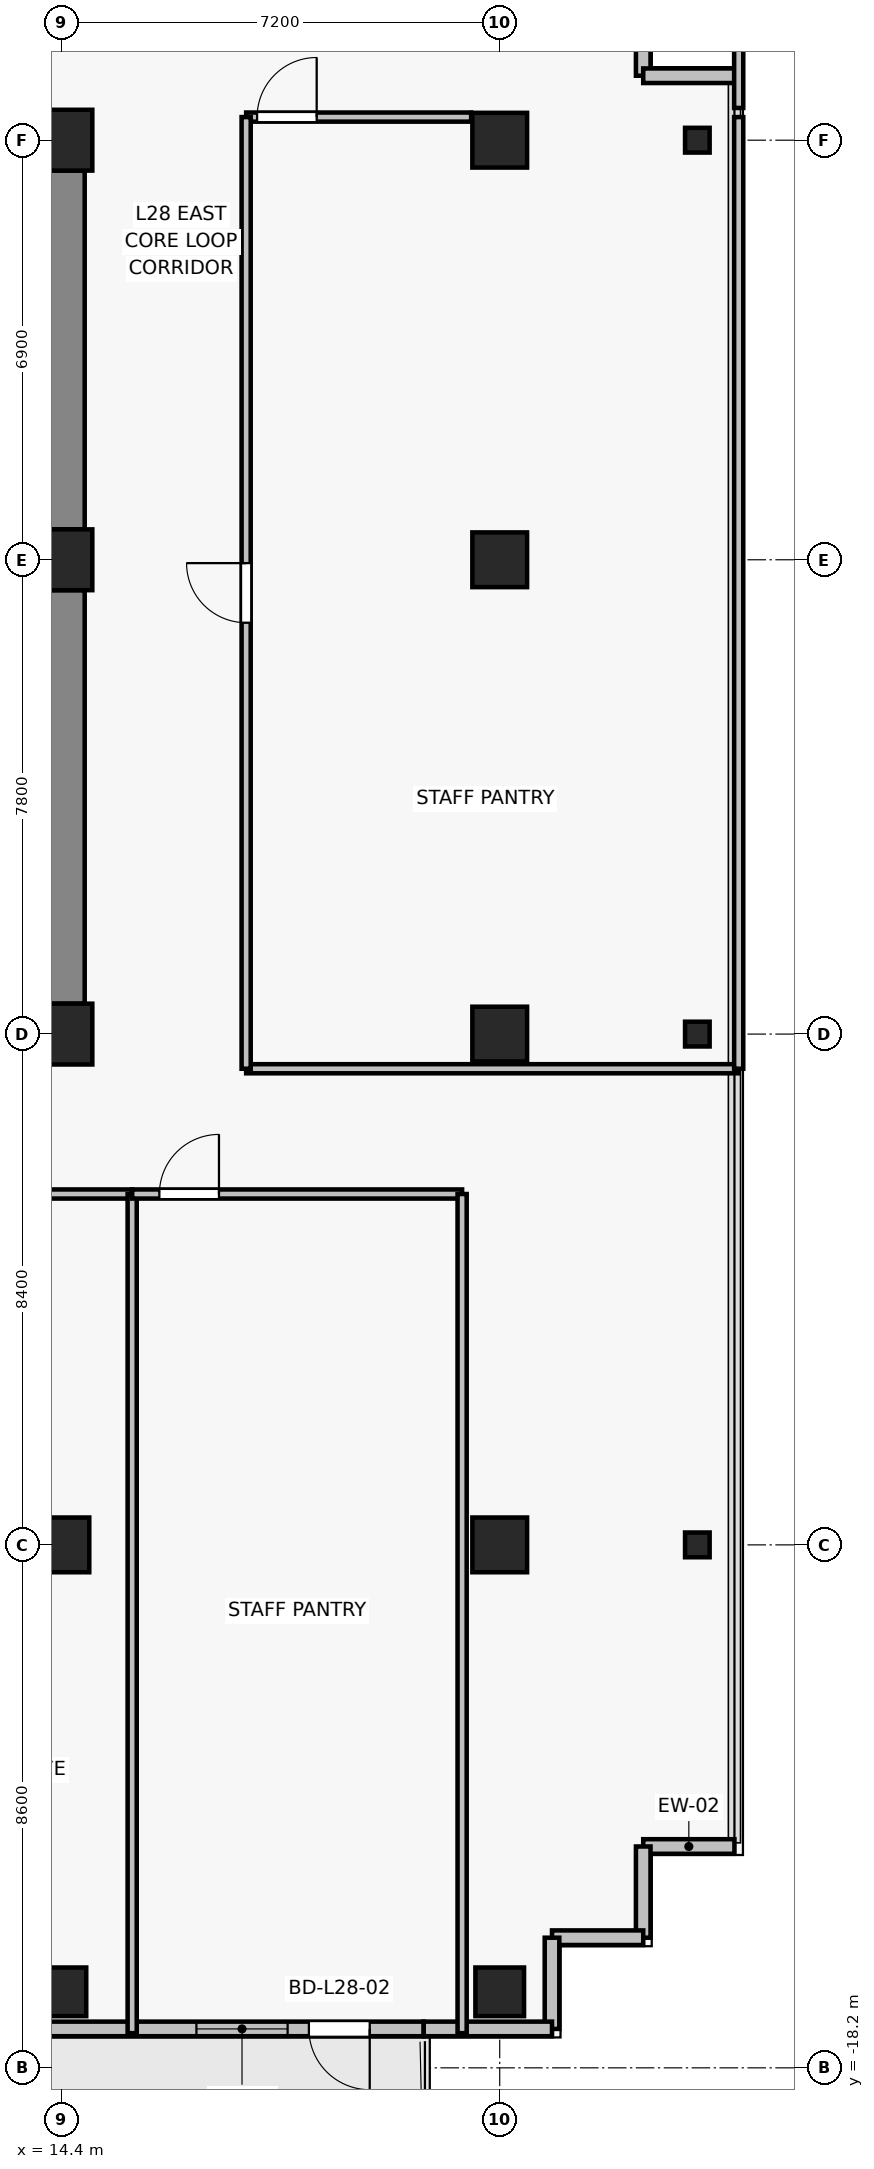
"""IFC4 building model, lengths in metres.
Left out: names, types, materials, properties, quantities, classifications, styles, units other than length and angle.
Written with IfcOpenShell. Run it as: python <this file> out.ifc"""

import sys

from ifc_helpers import new_model, si_unit, direction, frame, frame_2d, origin, origin_2d, place, context, subcontext, project, spatial, rectangle, i_section, extrude, source, transform, mapped, element, fill, save


model = new_model("IFC4")
c1 = context("Model", 3, precision=1e-05, world=origin(), true_north=direction((0.0, 1.0)))
c2 = subcontext(c1, "Body", "Model", "MODEL_VIEW")
j1 = project(units=[si_unit("LENGTHUNIT", "METRE"), si_unit("PLANEANGLEUNIT", "RADIAN")], contexts=[c1])
p1 = place(None, origin())
s1 = spatial("IfcSite", under=j1, at=p1, CompositionType="ELEMENT")
p2 = place(p1, origin())
s2 = spatial("IfcBuilding", under=s1, at=p2, CompositionType="ELEMENT")
p3 = place(p2, frame((0.0, 0.0, 103.3)))
s3 = spatial("IfcBuildingStorey", under=s2, at=p3, CompositionType="ELEMENT", Elevation=103.3)
for number, where, z_axis, x_axis in (
    (1, (14.4, -1.2, 0.0), (0.0, 0.0, 1.0), (1.0, 0.0, 0.0)),
    (2, (14.4, 6.6, 0.0), (0.0, 0.0, 1.0), (1.0, 0.0, 0.0)),
    (3, (14.4, 13.5, 0.0), (0.0, 0.0, 1.0), (1.0, 0.0, 0.0)),
):
    element("IfcColumn", number, at=place(p3, frame(where, z_axis=z_axis, x_axis=x_axis)), inside=s3, PredefinedType="COLUMN", context=c2, shape_type="SweptSolid", body=[
        extrude(rectangle(XDim=1.0, YDim=1.0, at=origin_2d()), origin(), (0.0, 0.0, 1.0), 3.3),
    ])
for number, where, z_axis, x_axis in (
    (4, (14.4, -9.6, 0.0), (0.0, 0.0, 1.0), (1.0, 0.0, 0.0)),
    (5, (21.6, -9.6, 0.0), (0.0, 0.0, 1.0), (1.0, 0.0, 0.0)),
    (6, (21.6, -1.2, 0.0), (0.0, 0.0, 1.0), (1.0, 0.0, 0.0)),
    (7, (21.6, 6.6, 0.0), (0.0, 0.0, 1.0), (1.0, 0.0, 0.0)),
    (8, (21.6, 13.5, 0.0), (0.0, 0.0, 1.0), (1.0, 0.0, 0.0)),
):
    element("IfcColumn", number, at=place(p3, frame(where, z_axis=z_axis, x_axis=x_axis)), inside=s3, PredefinedType="COLUMN", context=c2, shape_type="SweptSolid", body=[
        extrude(rectangle(XDim=0.9, YDim=0.9, at=origin_2d()), origin(), (0.0, 0.0, 1.0), 3.3),
    ])
for number, where, z_axis, x_axis in (
    (9, (14.4, -16.95, 0.0), (0.0, 0.0, 1.0), (1.0, 0.0, 0.0)),
    (10, (21.6, -16.95, 0.0), (0.0, 0.0, 1.0), (1.0, 0.0, 0.0)),
):
    element("IfcColumn", number, at=place(p3, frame(where, z_axis=z_axis, x_axis=x_axis)), inside=s3, PredefinedType="COLUMN", context=c2, shape_type="SweptSolid", body=[
        extrude(rectangle(XDim=0.8, YDim=0.8, at=origin_2d()), origin(), (0.0, 0.0, 1.0), 3.3),
    ])
for number, where, z_axis, x_axis in (
    (11, (24.85, -9.6, 0.0), (0.0, 0.0, 1.0), (1.0, 0.0, 0.0)),
    (12, (24.85, -1.2, 0.0), (0.0, 0.0, 1.0), (1.0, 0.0, 0.0)),
    (13, (24.85, 13.5, 0.0), (0.0, 0.0, 1.0), (1.0, 0.0, 0.0)),
):
    element("IfcColumn", number, at=place(p3, frame(where, z_axis=z_axis, x_axis=x_axis)), inside=s3, PredefinedType="COLUMN", context=c2, shape_type="SweptSolid", body=[
        extrude(i_section(OverallWidth=0.404, OverallDepth=0.407, WebThickness=0.022, FlangeThickness=0.032, FilletRadius=0.015, at=origin_2d()), origin(), (0.0, 0.0, 1.0), 3.3),
    ])
p4 = place(p3, frame((14.4, -0.7, 0.0), z_axis=(0.0, 0.0, 1.0), x_axis=(0.0, 1.0, 0.0)))
e14 = element("IfcWall", 14, at=p4, inside=s3, PredefinedType="SHEAR", context=c2, shape_type="SweptSolid", body=[
    extrude(rectangle(XDim=6.8, YDim=0.75, at=frame_2d((3.4, 0.0))), origin(), (0.0, 0.0, 1.0), 3.075),
])
p5 = place(p3, frame((14.4, 7.1, 0.0), z_axis=(0.0, 0.0, 1.0), x_axis=(0.0, 1.0, 0.0)))
e15 = element("IfcWall", 15, at=p5, inside=s3, PredefinedType="SHEAR", context=c2, shape_type="SweptSolid", body=[
    extrude(rectangle(XDim=5.9, YDim=0.75, at=frame_2d((2.95, 0.0))), origin(), (0.0, 0.0, 1.0), 3.075),
])
p6 = place(p3, frame((20.35, -17.56, 0.0), z_axis=(0.0, 0.0, 1.0), x_axis=(-1.0, 0.0, 0.0)))
e16 = element("IfcWall", 16, at=p6, inside=s3, PredefinedType="SOLIDWALL", context=c2, shape_type="SweptSolid", body=[
    extrude(rectangle(XDim=7.4, YDim=0.24, at=frame_2d((3.7, 0.0))), origin(), (0.0, 0.0, 1.0), 2.665),
])
p7 = place(p6, frame((0.888, 0.0, 0.0)))
e17 = element("IfcOpeningElement", 17, at=p7, cuts=e16, PredefinedType="OPENING", context=c2, shape_type="SweptSolid", body=[
    extrude(rectangle(XDim=1.0, YDim=2.2, at=frame_2d((0.5, 1.1))), frame((0.0, 0.13, 0.0), z_axis=(0.0, -1.0, 0.0), x_axis=(1.0, 0.0, 0.0)), (0.0, 0.0, 1.0), 0.26),
])
p8 = place(p6, frame((2.238, 0.0, 0.85)))
e18 = element("IfcOpeningElement", 18, at=p8, cuts=e16, PredefinedType="OPENING", context=c2, shape_type="SweptSolid", body=[
    extrude(rectangle(XDim=1.5, YDim=1.6, at=frame_2d((0.75, 0.8))), frame((0.0, 0.13, 0.0), z_axis=(0.0, -1.0, 0.0), x_axis=(1.0, 0.0, 0.0)), (0.0, 0.0, 1.0), 0.26),
])
for number, where, z_axis, x_axis in (
    (19, (23.96, 14.56, 0.0), (0.0, 0.0, 1.0), (0.0, 1.0, 0.0)),
    (20, (25.46, 14.56, 0.0), (0.0, 0.0, 1.0), (-1.0, 0.0, 0.0)),
    (21, (23.96, -14.56, 0.0), (0.0, 0.0, 1.0), (1.0, 0.0, 0.0)),
    (22, (23.96, -16.06, 0.0), (0.0, 0.0, 1.0), (0.0, 1.0, 0.0)),
    (23, (22.46, -16.06, 0.0), (0.0, 0.0, 1.0), (1.0, 0.0, 0.0)),
):
    element("IfcWall", number, at=place(p3, frame(where, z_axis=z_axis, x_axis=x_axis)), inside=s3, PredefinedType="SOLIDWALL", context=c2, shape_type="SweptSolid", body=[
        extrude(rectangle(XDim=1.5, YDim=0.24, at=frame_2d((0.75, 0.0))), origin(), (0.0, 0.0, 1.0), 3.075),
    ])
p9 = place(p3, frame((22.46, -17.56, 0.0), z_axis=(0.0, 0.0, 1.0), x_axis=(0.0, 1.0, 0.0)))
e24 = element("IfcWall", 24, at=p9, inside=s3, PredefinedType="SOLIDWALL", context=c2, shape_type="SweptSolid", body=[
    extrude(rectangle(XDim=1.5, YDim=0.24, at=frame_2d((0.75, 0.0))), origin(), (0.0, 0.0, 1.0), 2.565),
])
p10 = place(p3, frame((20.35, -17.56, 0.0), z_axis=(0.0, 0.0, 1.0), x_axis=(1.0, 0.0, 0.0)))
e25 = element("IfcWall", 25, at=p10, inside=s3, PredefinedType="SOLIDWALL", context=c2, shape_type="SweptSolid", body=[
    extrude(rectangle(XDim=2.11, YDim=0.24, at=frame_2d((1.055, 0.0))), origin(), (0.0, 0.0, 1.0), 3.075),
])
p11 = place(p3, frame((10.568, -3.83, 0.0), z_axis=(0.0, 0.0, 1.0), x_axis=(1.0, 0.0, 0.0)))
e26 = element("IfcWall", 26, at=p11, inside=s3, PredefinedType="PARTITIONING", context=c2, shape_type="SweptSolid", body=[
    extrude(rectangle(XDim=4.987, YDim=0.15, at=frame_2d((2.494, 0.0))), origin(), (0.0, 0.0, 1.0), 2.515),
])
p12 = place(p11, frame((2.004, 0.0, 0.0)))
e27 = element("IfcOpeningElement", 27, at=p12, cuts=e26, PredefinedType="OPENING", context=c2, shape_type="SweptSolid", body=[
    extrude(rectangle(XDim=0.98, YDim=2.15, at=frame_2d((0.49, 1.075))), frame((0.0, 0.085, 0.0), z_axis=(0.0, -1.0, 0.0), x_axis=(1.0, 0.0, 0.0)), (0.0, 0.0, 1.0), 0.17),
])
p13 = place(p3, frame((15.556, -3.83, 0.0), z_axis=(0.0, 0.0, 1.0), x_axis=(0.0, -1.0, 0.0)))
e28 = element("IfcWall", 28, at=p13, inside=s3, PredefinedType="PARTITIONING", context=c2, shape_type="SweptSolid", body=[
    extrude(rectangle(XDim=13.8, YDim=0.15, at=frame_2d((6.9, 0.0))), origin(), (0.0, 0.0, 1.0), 2.515),
])
p14 = place(p3, frame((15.556, -3.83, 0.0), z_axis=(0.0, 0.0, 1.0), x_axis=(1.0, 0.0, 0.0)))
e29 = element("IfcWall", 29, at=p14, inside=s3, PredefinedType="PARTITIONING", context=c2, shape_type="SweptSolid", body=[
    extrude(rectangle(XDim=5.426, YDim=0.15, at=frame_2d((2.713, 0.0))), origin(), (0.0, 0.0, 1.0), 3.075),
])
p15 = place(p14, frame((0.448, 0.0, 0.0)))
e30 = element("IfcOpeningElement", 30, at=p15, cuts=e29, PredefinedType="OPENING", context=c2, shape_type="SweptSolid", body=[
    extrude(rectangle(XDim=0.98, YDim=2.15, at=frame_2d((0.49, 1.075))), frame((0.0, 0.085, 0.0), z_axis=(0.0, -1.0, 0.0), x_axis=(1.0, 0.0, 0.0)), (0.0, 0.0, 1.0), 0.17),
])
p16 = place(p3, frame((20.982, -3.83, 0.0), z_axis=(0.0, 0.0, 1.0), x_axis=(0.0, -1.0, 0.0)))
e31 = element("IfcWall", 31, at=p16, inside=s3, PredefinedType="PARTITIONING", context=c2, shape_type="SweptSolid", body=[
    extrude(rectangle(XDim=13.8, YDim=0.15, at=frame_2d((6.9, 0.0))), origin(), (0.0, 0.0, 1.0), 2.515),
])
p17 = place(p3, frame((25.53, -1.77, 0.0), z_axis=(0.0, 0.0, 1.0), x_axis=(-1.0, 0.0, 0.0)))
e32 = element("IfcWall", 32, at=p17, inside=s3, PredefinedType="PARTITIONING", context=c2, shape_type="SweptSolid", body=[
    extrude(rectangle(XDim=8.1, YDim=0.15, at=frame_2d((4.05, 0.0))), origin(), (0.0, 0.0, 1.0), 2.515),
])
p18 = place(p3, frame((17.43, 13.88, 0.0), z_axis=(0.0, 0.0, 1.0), x_axis=(1.0, 0.0, 0.0)))
e33 = element("IfcWall", 33, at=p18, inside=s3, PredefinedType="PARTITIONING", context=c2, shape_type="SweptSolid", body=[
    extrude(rectangle(XDim=3.7, YDim=0.15, at=frame_2d((1.85, 0.0))), origin(), (0.0, 0.0, 1.0), 3.075),
])
p19 = place(p18, frame((0.18, 0.0, 0.0)))
e34 = element("IfcOpeningElement", 34, at=p19, cuts=e33, PredefinedType="OPENING", context=c2, shape_type="SweptSolid", body=[
    extrude(rectangle(XDim=0.98, YDim=2.15, at=frame_2d((0.49, 1.075))), frame((0.0, 0.085, 0.0), z_axis=(0.0, -1.0, 0.0), x_axis=(1.0, 0.0, 0.0)), (0.0, 0.0, 1.0), 0.17),
])
p20 = place(p3, frame((17.43, -1.77, 0.0), z_axis=(0.0, 0.0, 1.0), x_axis=(0.0, 1.0, 0.0)))
e35 = element("IfcWall", 35, at=p20, inside=s3, PredefinedType="PARTITIONING", context=c2, shape_type="SweptSolid", body=[
    extrude(rectangle(XDim=15.65, YDim=0.15, at=frame_2d((7.825, 0.0))), origin(), (0.0, 0.0, 1.0), 2.515),
])
p21 = place(p20, frame((7.335, 0.0, 0.0)))
e36 = element("IfcOpeningElement", 36, at=p21, cuts=e35, PredefinedType="OPENING", context=c2, shape_type="SweptSolid", body=[
    extrude(rectangle(XDim=0.98, YDim=2.15, at=frame_2d((0.49, 1.075))), frame((0.0, 0.085, 0.0), z_axis=(0.0, -1.0, 0.0), x_axis=(1.0, 0.0, 0.0)), (0.0, 0.0, 1.0), 0.17),
])
p22 = place(p3, frame((25.53, 13.88, 0.0), z_axis=(0.0, 0.0, 1.0), x_axis=(0.0, -1.0, 0.0)))
e37 = element("IfcWall", 37, at=p22, inside=s3, PredefinedType="PARTITIONING", context=c2, shape_type="SweptSolid", body=[
    extrude(rectangle(XDim=15.65, YDim=0.15, at=frame_2d((7.825, 0.0))), origin(), (0.0, 0.0, 1.0), 3.075),
])
p23 = place(p3, frame((25.53, 17.63, 0.0), z_axis=(0.0, 0.0, 1.0), x_axis=(0.0, -1.0, 0.0)))
e38 = element("IfcWall", 38, at=p23, inside=s3, PredefinedType="PARTITIONING", context=c2, shape_type="SweptSolid", body=[
    extrude(rectangle(XDim=3.6, YDim=0.15, at=frame_2d((1.8, 0.0))), origin(), (0.0, 0.0, 1.0), 3.075),
])
m1 = source(origin(), c2, "Body", "SweptSolid", [
    extrude(rectangle(XDim=1.0, YDim=2.2, at=frame_2d((0.5, 1.1))), frame((0.0, 0.025, 0.0), z_axis=(0.0, -1.0, 0.0), x_axis=(1.0, 0.0, 0.0)), (0.0, 0.0, 1.0), 0.05),
])
p24 = place(p7, origin())
e39 = element("IfcDoor", 39, at=p24, inside=s3, OperationType="SINGLE_SWING_LEFT", PredefinedType="DOOR", context=c2, shape_type="MappedRepresentation", body=[
    mapped(m1, transform((0.0, 0.0, 0.0), x_axis=(1.0, 0.0, 0.0), y_axis=(0.0, 1.0, 0.0), z_axis=(0.0, 0.0, 1.0), scale=1.0)),
])
fill(e17, e39)
m2 = source(origin(), c2, "Body", "SweptSolid", [
    extrude(rectangle(XDim=1.5, YDim=1.6, at=frame_2d((0.75, 0.8))), frame((0.0, 0.03, 0.0), z_axis=(0.0, -1.0, 0.0), x_axis=(1.0, 0.0, 0.0)), (0.0, 0.0, 1.0), 0.06),
])
p25 = place(p8, origin())
e40 = element("IfcWindow", 40, at=p25, inside=s3, PartitioningType="SINGLE_PANEL", PredefinedType="WINDOW", context=c2, shape_type="MappedRepresentation", body=[
    mapped(m2, transform((0.0, 0.0, 0.0), x_axis=(1.0, 0.0, 0.0), y_axis=(0.0, 1.0, 0.0), z_axis=(0.0, 0.0, 1.0), scale=1.0)),
])
fill(e18, e40)
m3 = source(origin(), c2, "Body", "SweptSolid", [
    extrude(rectangle(XDim=0.98, YDim=2.15, at=frame_2d((0.49, 1.075))), frame((0.0, 0.025, 0.0), z_axis=(0.0, -1.0, 0.0), x_axis=(1.0, 0.0, 0.0)), (0.0, 0.0, 1.0), 0.05),
])
p26 = place(p15, origin())
e41 = element("IfcDoor", 41, at=p26, inside=s3, OperationType="SINGLE_SWING_RIGHT", PredefinedType="DOOR", context=c2, shape_type="MappedRepresentation", body=[
    mapped(m3, transform((0.0, 0.0, 0.0), x_axis=(1.0, 0.0, 0.0), y_axis=(0.0, 1.0, 0.0), z_axis=(0.0, 0.0, 1.0), scale=1.0)),
])
fill(e30, e41)
p27 = place(p21, origin())
e42 = element("IfcDoor", 42, at=p27, inside=s3, OperationType="SINGLE_SWING_RIGHT", PredefinedType="DOOR", context=c2, shape_type="MappedRepresentation", body=[
    mapped(m3, transform((0.0, 0.0, 0.0), x_axis=(1.0, 0.0, 0.0), y_axis=(0.0, 1.0, 0.0), z_axis=(0.0, 0.0, 1.0), scale=1.0)),
])
fill(e36, e42)
p28 = place(p19, origin())
e43 = element("IfcDoor", 43, at=p28, inside=s3, OperationType="SINGLE_SWING_RIGHT", PredefinedType="DOOR", context=c2, shape_type="MappedRepresentation", body=[
    mapped(m3, transform((0.0, 0.0, 0.0), x_axis=(1.0, 0.0, 0.0), y_axis=(0.0, 1.0, 0.0), z_axis=(0.0, 0.0, 1.0), scale=1.0)),
])
fill(e34, e43)
save(model, sys.argv[1])
